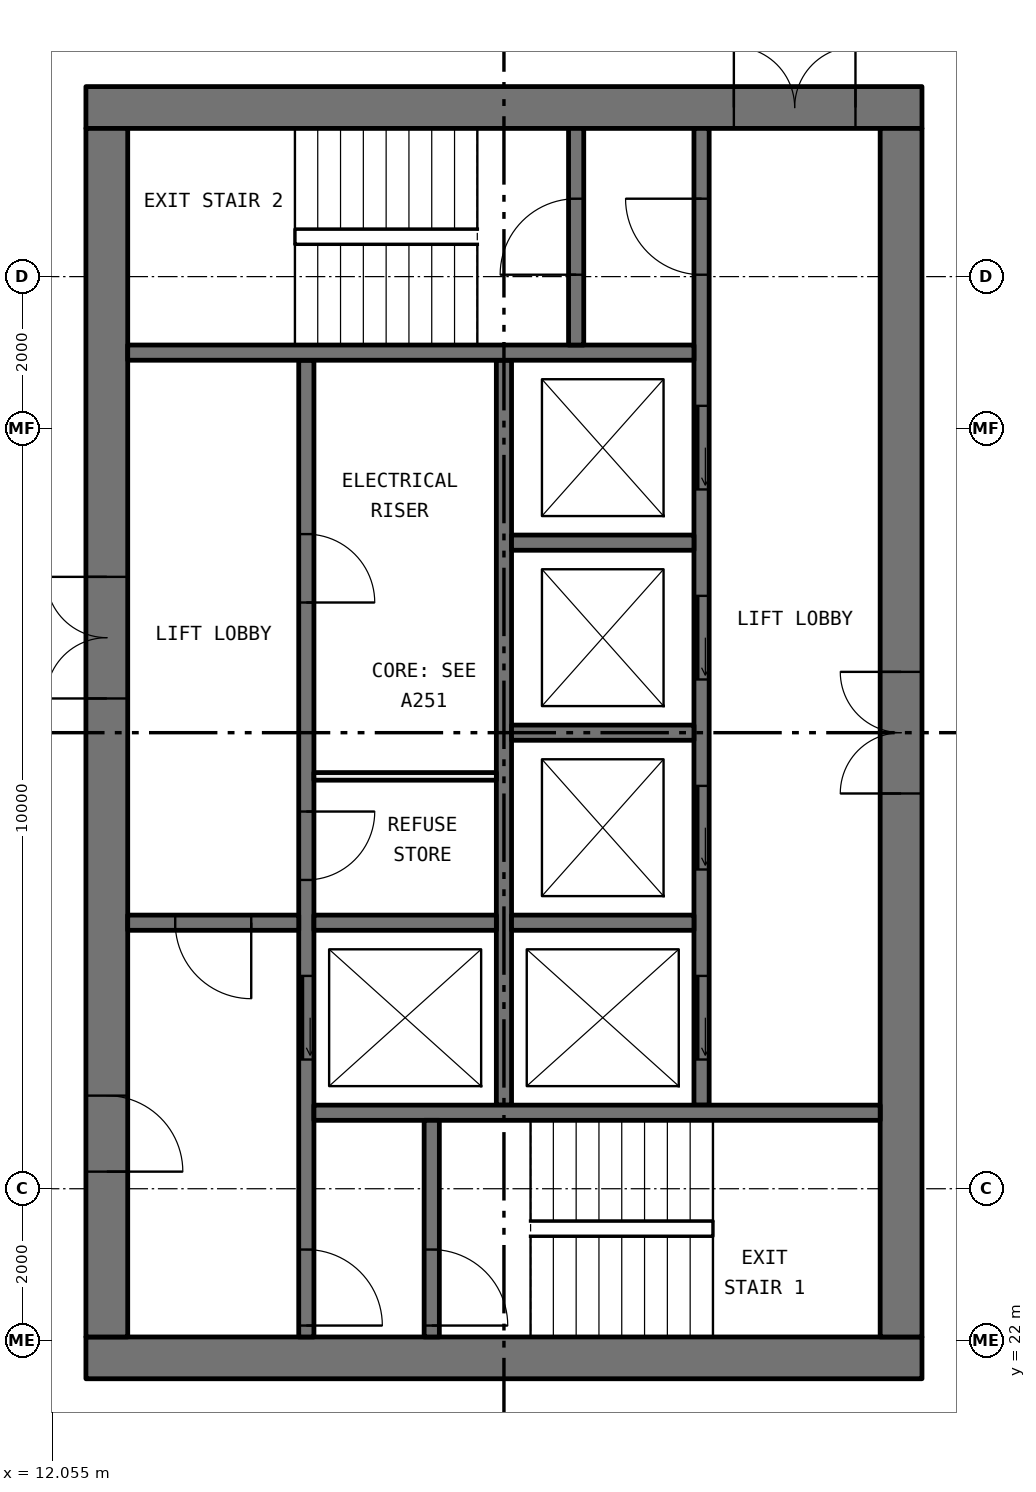
"""IFC4 building model, lengths in metres.
Left out: names, types, materials, properties, quantities, classifications, styles, units other than length and angle.
Written with IfcOpenShell. Run it as: python <this file> out.ifc"""

import sys

from ifc_helpers import new_model, si_unit, direction, frame, frame_2d, origin, place, context, subcontext, project, spatial, rectangle, extrude, element, fill, save


model = new_model("IFC4")
c1 = context("Model", 3, precision=1e-05, world=origin(), true_north=direction((0.0, 1.0)))
c2 = subcontext(c1, "Body", "Model", "MODEL_VIEW")
j1 = project(units=[si_unit("LENGTHUNIT", "METRE"), si_unit("PLANEANGLEUNIT", "RADIAN")], contexts=[c1])
p1 = place(None, origin())
s1 = spatial("IfcSite", under=j1, at=p1, CompositionType="ELEMENT")
p2 = place(p1, origin())
s2 = spatial("IfcBuilding", under=s1, at=p2, CompositionType="ELEMENT")
p3 = place(p2, frame((0.0, 0.0, 189.3)))
s3 = spatial("IfcBuildingStorey", under=s2, at=p3, CompositionType="ELEMENT", Elevation=189.3)
p4 = place(p3, frame((12.5, 21.775, 0.0), z_axis=(0.0, 0.0, 1.0), x_axis=(1.0, 0.0, 0.0)))
e1 = element("IfcWall", 1, at=p4, inside=s3, PredefinedType="SHEAR", context=c2, shape_type="SweptSolid", body=[
    extrude(rectangle(XDim=11.0, YDim=0.55, at=frame_2d((5.5, 0.0))), origin(), (0.0, 0.0, 1.0), 3.05),
])
p5 = place(p3, frame((12.5, 38.225, 0.0), z_axis=(0.0, 0.0, 1.0), x_axis=(1.0, 0.0, 0.0)))
e2 = element("IfcWall", 2, at=p5, inside=s3, PredefinedType="SHEAR", context=c2, shape_type="SweptSolid", body=[
    extrude(rectangle(XDim=11.0, YDim=0.55, at=frame_2d((5.5, 0.0))), origin(), (0.0, 0.0, 1.0), 3.05),
])
p6 = place(p5, frame((8.525, 0.0, 0.0)))
e3 = element("IfcOpeningElement", 3, at=p6, cuts=e2, PredefinedType="OPENING", context=c2, shape_type="SweptSolid", body=[
    extrude(rectangle(XDim=1.6, YDim=2.1, at=frame_2d((0.8, 1.05))), frame((0.0, 0.285, 0.0), z_axis=(0.0, -1.0, 0.0), x_axis=(1.0, 0.0, 0.0)), (0.0, 0.0, 1.0), 0.57),
])
p7 = place(p3, frame((12.775, 22.05, 0.0), z_axis=(0.0, 0.0, 1.0), x_axis=(0.0, 1.0, 0.0)))
e4 = element("IfcWall", 4, at=p7, inside=s3, PredefinedType="SHEAR", context=c2, shape_type="SweptSolid", body=[
    extrude(rectangle(XDim=15.9, YDim=0.55, at=frame_2d((7.95, 0.0))), origin(), (0.0, 0.0, 1.0), 3.05),
])
p8 = place(p7, frame((8.4, 0.0, 0.0)))
e5 = element("IfcOpeningElement", 5, at=p8, cuts=e4, PredefinedType="OPENING", context=c2, shape_type="SweptSolid", body=[
    extrude(rectangle(XDim=1.6, YDim=2.1, at=frame_2d((0.8, 1.05))), frame((0.0, 0.285, 0.0), z_axis=(0.0, -1.0, 0.0), x_axis=(1.0, 0.0, 0.0)), (0.0, 0.0, 1.0), 0.57),
])
p9 = place(p7, frame((2.175, 0.0, 0.0)))
e6 = element("IfcOpeningElement", 6, at=p9, cuts=e4, PredefinedType="OPENING", context=c2, shape_type="SweptSolid", body=[
    extrude(rectangle(XDim=1.0, YDim=2.1, at=frame_2d((0.5, 1.05))), frame((0.0, 0.285, 0.0), z_axis=(0.0, -1.0, 0.0), x_axis=(1.0, 0.0, 0.0)), (0.0, 0.0, 1.0), 0.57),
])
p10 = place(p3, frame((23.225, 22.05, 0.0), z_axis=(0.0, 0.0, 1.0), x_axis=(0.0, 1.0, 0.0)))
e7 = element("IfcWall", 7, at=p10, inside=s3, PredefinedType="SHEAR", context=c2, shape_type="SweptSolid", body=[
    extrude(rectangle(XDim=15.9, YDim=0.55, at=frame_2d((7.95, 0.0))), origin(), (0.0, 0.0, 1.0), 3.05),
])
p11 = place(p10, frame((7.15, 0.0, 0.0)))
e8 = element("IfcOpeningElement", 8, at=p11, cuts=e7, PredefinedType="OPENING", context=c2, shape_type="SweptSolid", body=[
    extrude(rectangle(XDim=1.6, YDim=2.1, at=frame_2d((0.8, 1.05))), frame((0.0, 0.285, 0.0), z_axis=(0.0, -1.0, 0.0), x_axis=(1.0, 0.0, 0.0)), (0.0, 0.0, 1.0), 0.57),
])
p12 = place(p3, frame((15.4, 22.05, 0.0), z_axis=(0.0, 0.0, 1.0), x_axis=(0.0, 1.0, 0.0)))
e9 = element("IfcWall", 9, at=p12, inside=s3, PredefinedType="SOLIDWALL", context=c2, shape_type="SweptSolid", body=[
    extrude(rectangle(XDim=12.85, YDim=0.2, at=frame_2d((6.425, 0.0))), origin(), (0.0, 0.0, 1.0), 3.05),
])
p13 = place(p12, frame((3.65, 0.0, 0.0)))
e10 = element("IfcOpeningElement", 10, at=p13, cuts=e9, PredefinedType="OPENING", context=c2, shape_type="SweptSolid", body=[
    extrude(rectangle(XDim=1.1, YDim=2.1, at=frame_2d((0.55, 1.05))), frame((0.0, 0.11, 0.0), z_axis=(0.0, -1.0, 0.0), x_axis=(1.0, 0.0, 0.0)), (0.0, 0.0, 1.0), 0.22),
])
p14 = place(p12, frame((0.15, 0.0, 0.0)))
e11 = element("IfcOpeningElement", 11, at=p14, cuts=e9, PredefinedType="OPENING", context=c2, shape_type="SweptSolid", body=[
    extrude(rectangle(XDim=1.0, YDim=2.1, at=frame_2d((0.5, 1.05))), frame((0.0, 0.11, 0.0), z_axis=(0.0, -1.0, 0.0), x_axis=(1.0, 0.0, 0.0)), (0.0, 0.0, 1.0), 0.22),
])
p15 = place(p12, frame((6.012, 0.0, 0.0)))
e12 = element("IfcOpeningElement", 12, at=p15, cuts=e9, PredefinedType="OPENING", context=c2, shape_type="SweptSolid", body=[
    extrude(rectangle(XDim=0.9, YDim=2.1, at=frame_2d((0.45, 1.05))), frame((0.0, 0.11, 0.0), z_axis=(0.0, -1.0, 0.0), x_axis=(1.0, 0.0, 0.0)), (0.0, 0.0, 1.0), 0.22),
])
p16 = place(p12, frame((9.663, 0.0, 0.0)))
e13 = element("IfcOpeningElement", 13, at=p16, cuts=e9, PredefinedType="OPENING", context=c2, shape_type="SweptSolid", body=[
    extrude(rectangle(XDim=0.9, YDim=2.1, at=frame_2d((0.45, 1.05))), frame((0.0, 0.11, 0.0), z_axis=(0.0, -1.0, 0.0), x_axis=(1.0, 0.0, 0.0)), (0.0, 0.0, 1.0), 0.22),
])
p17 = place(p3, frame((20.6, 25.1, 0.0), z_axis=(0.0, 0.0, 1.0), x_axis=(0.0, 1.0, 0.0)))
e14 = element("IfcWall", 14, at=p17, inside=s3, PredefinedType="SOLIDWALL", context=c2, shape_type="SweptSolid", body=[
    extrude(rectangle(XDim=12.85, YDim=0.2, at=frame_2d((6.425, 0.0))), origin(), (0.0, 0.0, 1.0), 3.05),
])
p18 = place(p17, frame((0.6, 0.0, 0.0)))
e15 = element("IfcOpeningElement", 15, at=p18, cuts=e14, PredefinedType="OPENING", context=c2, shape_type="SweptSolid", body=[
    extrude(rectangle(XDim=1.1, YDim=2.1, at=frame_2d((0.55, 1.05))), frame((0.0, 0.11, 0.0), z_axis=(0.0, -1.0, 0.0), x_axis=(1.0, 0.0, 0.0)), (0.0, 0.0, 1.0), 0.22),
])
p19 = place(p17, frame((3.1, 0.0, 0.0)))
e16 = element("IfcOpeningElement", 16, at=p19, cuts=e14, PredefinedType="OPENING", context=c2, shape_type="SweptSolid", body=[
    extrude(rectangle(XDim=1.1, YDim=2.1, at=frame_2d((0.55, 1.05))), frame((0.0, 0.11, 0.0), z_axis=(0.0, -1.0, 0.0), x_axis=(1.0, 0.0, 0.0)), (0.0, 0.0, 1.0), 0.22),
])
p20 = place(p17, frame((5.6, 0.0, 0.0)))
e17 = element("IfcOpeningElement", 17, at=p20, cuts=e14, PredefinedType="OPENING", context=c2, shape_type="SweptSolid", body=[
    extrude(rectangle(XDim=1.1, YDim=2.1, at=frame_2d((0.55, 1.05))), frame((0.0, 0.11, 0.0), z_axis=(0.0, -1.0, 0.0), x_axis=(1.0, 0.0, 0.0)), (0.0, 0.0, 1.0), 0.22),
])
p21 = place(p17, frame((8.1, 0.0, 0.0)))
e18 = element("IfcOpeningElement", 18, at=p21, cuts=e14, PredefinedType="OPENING", context=c2, shape_type="SweptSolid", body=[
    extrude(rectangle(XDim=1.1, YDim=2.1, at=frame_2d((0.55, 1.05))), frame((0.0, 0.11, 0.0), z_axis=(0.0, -1.0, 0.0), x_axis=(1.0, 0.0, 0.0)), (0.0, 0.0, 1.0), 0.22),
])
p22 = place(p17, frame((10.925, 0.0, 0.0)))
e19 = element("IfcOpeningElement", 19, at=p22, cuts=e14, PredefinedType="OPENING", context=c2, shape_type="SweptSolid", body=[
    extrude(rectangle(XDim=1.0, YDim=2.1, at=frame_2d((0.5, 1.05))), frame((0.0, 0.11, 0.0), z_axis=(0.0, -1.0, 0.0), x_axis=(1.0, 0.0, 0.0)), (0.0, 0.0, 1.0), 0.22),
])
p23 = place(p3, frame((18.0, 25.1, 0.0), z_axis=(0.0, 0.0, 1.0), x_axis=(0.0, 1.0, 0.0)))
e20 = element("IfcWall", 20, at=p23, inside=s3, PredefinedType="SOLIDWALL", context=c2, shape_type="SweptSolid", body=[
    extrude(rectangle(XDim=9.8, YDim=0.2, at=frame_2d((4.9, 0.0))), origin(), (0.0, 0.0, 1.0), 3.05),
])
for number, where, z_axis, x_axis in (
    (21, (15.5, 25.0, 0.0), (0.0, 0.0, 1.0), (1.0, 0.0, 0.0)),
    (22, (13.05, 35.0, 0.0), (0.0, 0.0, 1.0), (1.0, 0.0, 0.0)),
):
    element("IfcWall", number, at=place(p3, frame(where, z_axis=z_axis, x_axis=x_axis)), inside=s3, PredefinedType="SOLIDWALL", context=c2, shape_type="SweptSolid", body=[
        extrude(rectangle(XDim=7.45, YDim=0.2, at=frame_2d((3.725, 0.0))), origin(), (0.0, 0.0, 1.0), 3.05),
    ])
p24 = place(p3, frame((13.05, 27.5, 0.0), z_axis=(0.0, 0.0, 1.0), x_axis=(1.0, 0.0, 0.0)))
e23 = element("IfcWall", 23, at=p24, inside=s3, PredefinedType="SOLIDWALL", context=c2, shape_type="SweptSolid", body=[
    extrude(rectangle(XDim=2.25, YDim=0.2, at=frame_2d((1.125, 0.0))), origin(), (0.0, 0.0, 1.0), 3.05),
])
p25 = place(p24, frame((0.625, 0.0, 0.0)))
e24 = element("IfcOpeningElement", 24, at=p25, cuts=e23, PredefinedType="OPENING", context=c2, shape_type="SweptSolid", body=[
    extrude(rectangle(XDim=1.0, YDim=2.1, at=frame_2d((0.5, 1.05))), frame((0.0, 0.11, 0.0), z_axis=(0.0, -1.0, 0.0), x_axis=(1.0, 0.0, 0.0)), (0.0, 0.0, 1.0), 0.22),
])
p26 = place(p3, frame((17.05, 22.05, 0.0), z_axis=(0.0, 0.0, 1.0), x_axis=(0.0, 1.0, 0.0)))
e25 = element("IfcWall", 25, at=p26, inside=s3, PredefinedType="SOLIDWALL", context=c2, shape_type="SweptSolid", body=[
    extrude(rectangle(XDim=2.85, YDim=0.2, at=frame_2d((1.425, 0.0))), origin(), (0.0, 0.0, 1.0), 3.05),
])
p27 = place(p26, frame((0.15, 0.0, 0.0)))
e26 = element("IfcOpeningElement", 26, at=p27, cuts=e25, PredefinedType="OPENING", context=c2, shape_type="SweptSolid", body=[
    extrude(rectangle(XDim=1.0, YDim=2.1, at=frame_2d((0.5, 1.05))), frame((0.0, 0.11, 0.0), z_axis=(0.0, -1.0, 0.0), x_axis=(1.0, 0.0, 0.0)), (0.0, 0.0, 1.0), 0.22),
])
p28 = place(p3, frame((18.95, 35.1, 0.0), z_axis=(0.0, 0.0, 1.0), x_axis=(0.0, 1.0, 0.0)))
e27 = element("IfcWall", 27, at=p28, inside=s3, PredefinedType="SOLIDWALL", context=c2, shape_type="SweptSolid", body=[
    extrude(rectangle(XDim=2.85, YDim=0.2, at=frame_2d((1.425, 0.0))), origin(), (0.0, 0.0, 1.0), 3.05),
])
p29 = place(p28, frame((0.925, 0.0, 0.0)))
e28 = element("IfcOpeningElement", 28, at=p29, cuts=e27, PredefinedType="OPENING", context=c2, shape_type="SweptSolid", body=[
    extrude(rectangle(XDim=1.0, YDim=2.1, at=frame_2d((0.5, 1.05))), frame((0.0, 0.11, 0.0), z_axis=(0.0, -1.0, 0.0), x_axis=(1.0, 0.0, 0.0)), (0.0, 0.0, 1.0), 0.22),
])
for number, where, z_axis, x_axis in (
    (29, (15.5, 27.5, 0.0), (0.0, 0.0, 1.0), (1.0, 0.0, 0.0)),
    (30, (18.1, 27.5, 0.0), (0.0, 0.0, 1.0), (1.0, 0.0, 0.0)),
    (31, (18.1, 30.0, 0.0), (0.0, 0.0, 1.0), (1.0, 0.0, 0.0)),
    (32, (18.1, 32.5, 0.0), (0.0, 0.0, 1.0), (1.0, 0.0, 0.0)),
):
    element("IfcWall", number, at=place(p3, frame(where, z_axis=z_axis, x_axis=x_axis)), inside=s3, PredefinedType="SOLIDWALL", context=c2, shape_type="SweptSolid", body=[
        extrude(rectangle(XDim=2.4, YDim=0.2, at=frame_2d((1.2, 0.0))), origin(), (0.0, 0.0, 1.0), 3.05),
    ])
p30 = place(p3, frame((15.5, 29.425, 0.0), z_axis=(0.0, 0.0, 1.0), x_axis=(1.0, 0.0, 0.0)))
e33 = element("IfcWall", 33, at=p30, inside=s3, PredefinedType="PARTITIONING", context=c2, shape_type="SweptSolid", body=[
    extrude(rectangle(XDim=2.4, YDim=0.1, at=frame_2d((1.2, 0.0))), origin(), (0.0, 0.0, 1.0), 3.05),
])
p31 = place(p18, origin())
e34 = element("IfcDoor", 34, at=p31, inside=s3, OperationType="SLIDING_TO_LEFT", PredefinedType="DOOR", context=c2, shape_type="SweptSolid", body=[
    extrude(rectangle(XDim=1.1, YDim=2.1, at=frame_2d((0.55, 1.05))), frame((0.0, 0.025, 0.0), z_axis=(0.0, -1.0, 0.0), x_axis=(1.0, 0.0, 0.0)), (0.0, 0.0, 1.0), 0.05),
])
fill(e15, e34)
p32 = place(p19, origin())
e35 = element("IfcDoor", 35, at=p32, inside=s3, OperationType="SLIDING_TO_LEFT", PredefinedType="DOOR", context=c2, shape_type="SweptSolid", body=[
    extrude(rectangle(XDim=1.1, YDim=2.1, at=frame_2d((0.55, 1.05))), frame((0.0, 0.025, 0.0), z_axis=(0.0, -1.0, 0.0), x_axis=(1.0, 0.0, 0.0)), (0.0, 0.0, 1.0), 0.05),
])
fill(e16, e35)
p33 = place(p20, origin())
e36 = element("IfcDoor", 36, at=p33, inside=s3, OperationType="SLIDING_TO_LEFT", PredefinedType="DOOR", context=c2, shape_type="SweptSolid", body=[
    extrude(rectangle(XDim=1.1, YDim=2.1, at=frame_2d((0.55, 1.05))), frame((0.0, 0.025, 0.0), z_axis=(0.0, -1.0, 0.0), x_axis=(1.0, 0.0, 0.0)), (0.0, 0.0, 1.0), 0.05),
])
fill(e17, e36)
p34 = place(p21, origin())
e37 = element("IfcDoor", 37, at=p34, inside=s3, OperationType="SLIDING_TO_LEFT", PredefinedType="DOOR", context=c2, shape_type="SweptSolid", body=[
    extrude(rectangle(XDim=1.1, YDim=2.1, at=frame_2d((0.55, 1.05))), frame((0.0, 0.025, 0.0), z_axis=(0.0, -1.0, 0.0), x_axis=(1.0, 0.0, 0.0)), (0.0, 0.0, 1.0), 0.05),
])
fill(e18, e37)
p35 = place(p13, origin())
e38 = element("IfcDoor", 38, at=p35, inside=s3, OperationType="SLIDING_TO_LEFT", PredefinedType="DOOR", context=c2, shape_type="SweptSolid", body=[
    extrude(rectangle(XDim=1.1, YDim=2.1, at=frame_2d((0.55, 1.05))), frame((0.0, 0.025, 0.0), z_axis=(0.0, -1.0, 0.0), x_axis=(1.0, 0.0, 0.0)), (0.0, 0.0, 1.0), 0.05),
])
fill(e10, e38)
p36 = place(p27, frame((1.0, 0.0, 0.0), x_axis=(-1.0, 0.0, 0.0)))
e39 = element("IfcDoor", 39, at=p36, inside=s3, OperationType="SINGLE_SWING_LEFT", PredefinedType="DOOR", context=c2, shape_type="SweptSolid", body=[
    extrude(rectangle(XDim=1.0, YDim=2.1, at=frame_2d((0.5, 1.05))), frame((0.0, 0.025, 0.0), z_axis=(0.0, -1.0, 0.0), x_axis=(1.0, 0.0, 0.0)), (0.0, 0.0, 1.0), 0.05),
])
fill(e26, e39)
p37 = place(p14, frame((1.0, 0.0, 0.0), x_axis=(-1.0, 0.0, 0.0)))
e40 = element("IfcDoor", 40, at=p37, inside=s3, OperationType="SINGLE_SWING_LEFT", PredefinedType="DOOR", context=c2, shape_type="SweptSolid", body=[
    extrude(rectangle(XDim=1.0, YDim=2.1, at=frame_2d((0.5, 1.05))), frame((0.0, 0.025, 0.0), z_axis=(0.0, -1.0, 0.0), x_axis=(1.0, 0.0, 0.0)), (0.0, 0.0, 1.0), 0.05),
])
fill(e11, e40)
p38 = place(p22, origin())
e41 = element("IfcDoor", 41, at=p38, inside=s3, OperationType="SINGLE_SWING_LEFT", PredefinedType="DOOR", context=c2, shape_type="SweptSolid", body=[
    extrude(rectangle(XDim=1.0, YDim=2.1, at=frame_2d((0.5, 1.05))), frame((0.0, 0.025, 0.0), z_axis=(0.0, -1.0, 0.0), x_axis=(1.0, 0.0, 0.0)), (0.0, 0.0, 1.0), 0.05),
])
fill(e19, e41)
p39 = place(p29, origin())
e42 = element("IfcDoor", 42, at=p39, inside=s3, OperationType="SINGLE_SWING_RIGHT", PredefinedType="DOOR", context=c2, shape_type="SweptSolid", body=[
    extrude(rectangle(XDim=1.0, YDim=2.1, at=frame_2d((0.5, 1.05))), frame((0.0, 0.025, 0.0), z_axis=(0.0, -1.0, 0.0), x_axis=(1.0, 0.0, 0.0)), (0.0, 0.0, 1.0), 0.05),
])
fill(e28, e42)
p40 = place(p25, frame((1.0, 0.0, 0.0), x_axis=(-1.0, 0.0, 0.0)))
e43 = element("IfcDoor", 43, at=p40, inside=s3, OperationType="SINGLE_SWING_RIGHT", PredefinedType="DOOR", context=c2, shape_type="SweptSolid", body=[
    extrude(rectangle(XDim=1.0, YDim=2.1, at=frame_2d((0.5, 1.05))), frame((0.0, 0.025, 0.0), z_axis=(0.0, -1.0, 0.0), x_axis=(1.0, 0.0, 0.0)), (0.0, 0.0, 1.0), 0.05),
])
fill(e24, e43)
p41 = place(p8, origin())
e44 = element("IfcDoor", 44, at=p41, inside=s3, OperationType="DOUBLE_DOOR_SINGLE_SWING", PredefinedType="DOOR", context=c2, shape_type="SweptSolid", body=[
    extrude(rectangle(XDim=1.6, YDim=2.1, at=frame_2d((0.8, 1.05))), frame((0.0, 0.025, 0.0), z_axis=(0.0, -1.0, 0.0), x_axis=(1.0, 0.0, 0.0)), (0.0, 0.0, 1.0), 0.05),
])
fill(e5, e44)
p42 = place(p9, frame((1.0, 0.0, 0.0), x_axis=(-1.0, 0.0, 0.0)))
e45 = element("IfcDoor", 45, at=p42, inside=s3, OperationType="SINGLE_SWING_LEFT", PredefinedType="DOOR", context=c2, shape_type="SweptSolid", body=[
    extrude(rectangle(XDim=1.0, YDim=2.1, at=frame_2d((0.5, 1.05))), frame((0.0, 0.025, 0.0), z_axis=(0.0, -1.0, 0.0), x_axis=(1.0, 0.0, 0.0)), (0.0, 0.0, 1.0), 0.05),
])
fill(e6, e45)
p43 = place(p6, origin())
e46 = element("IfcDoor", 46, at=p43, inside=s3, OperationType="DOUBLE_DOOR_SINGLE_SWING", PredefinedType="DOOR", context=c2, shape_type="SweptSolid", body=[
    extrude(rectangle(XDim=1.6, YDim=2.1, at=frame_2d((0.8, 1.05))), frame((0.0, 0.025, 0.0), z_axis=(0.0, -1.0, 0.0), x_axis=(1.0, 0.0, 0.0)), (0.0, 0.0, 1.0), 0.05),
])
fill(e3, e46)
p44 = place(p11, origin())
e47 = element("IfcDoor", 47, at=p44, inside=s3, OperationType="DOUBLE_DOOR_SINGLE_SWING", PredefinedType="DOOR", context=c2, shape_type="SweptSolid", body=[
    extrude(rectangle(XDim=1.6, YDim=2.1, at=frame_2d((0.8, 1.05))), frame((0.0, 0.025, 0.0), z_axis=(0.0, -1.0, 0.0), x_axis=(1.0, 0.0, 0.0)), (0.0, 0.0, 1.0), 0.05),
])
fill(e8, e47)
p45 = place(p15, frame((0.9, 0.0, 0.0), x_axis=(-1.0, 0.0, 0.0)))
e48 = element("IfcDoor", 48, at=p45, inside=s3, OperationType="SINGLE_SWING_RIGHT", PredefinedType="DOOR", context=c2, shape_type="SweptSolid", body=[
    extrude(rectangle(XDim=0.9, YDim=2.1, at=frame_2d((0.45, 1.05))), frame((0.0, 0.025, 0.0), z_axis=(0.0, -1.0, 0.0), x_axis=(1.0, 0.0, 0.0)), (0.0, 0.0, 1.0), 0.05),
])
fill(e12, e48)
p46 = place(p16, frame((0.9, 0.0, 0.0), x_axis=(-1.0, 0.0, 0.0)))
e49 = element("IfcDoor", 49, at=p46, inside=s3, OperationType="SINGLE_SWING_LEFT", PredefinedType="DOOR", context=c2, shape_type="SweptSolid", body=[
    extrude(rectangle(XDim=0.9, YDim=2.1, at=frame_2d((0.45, 1.05))), frame((0.0, 0.025, 0.0), z_axis=(0.0, -1.0, 0.0), x_axis=(1.0, 0.0, 0.0)), (0.0, 0.0, 1.0), 0.05),
])
fill(e13, e49)
save(model, sys.argv[1])
